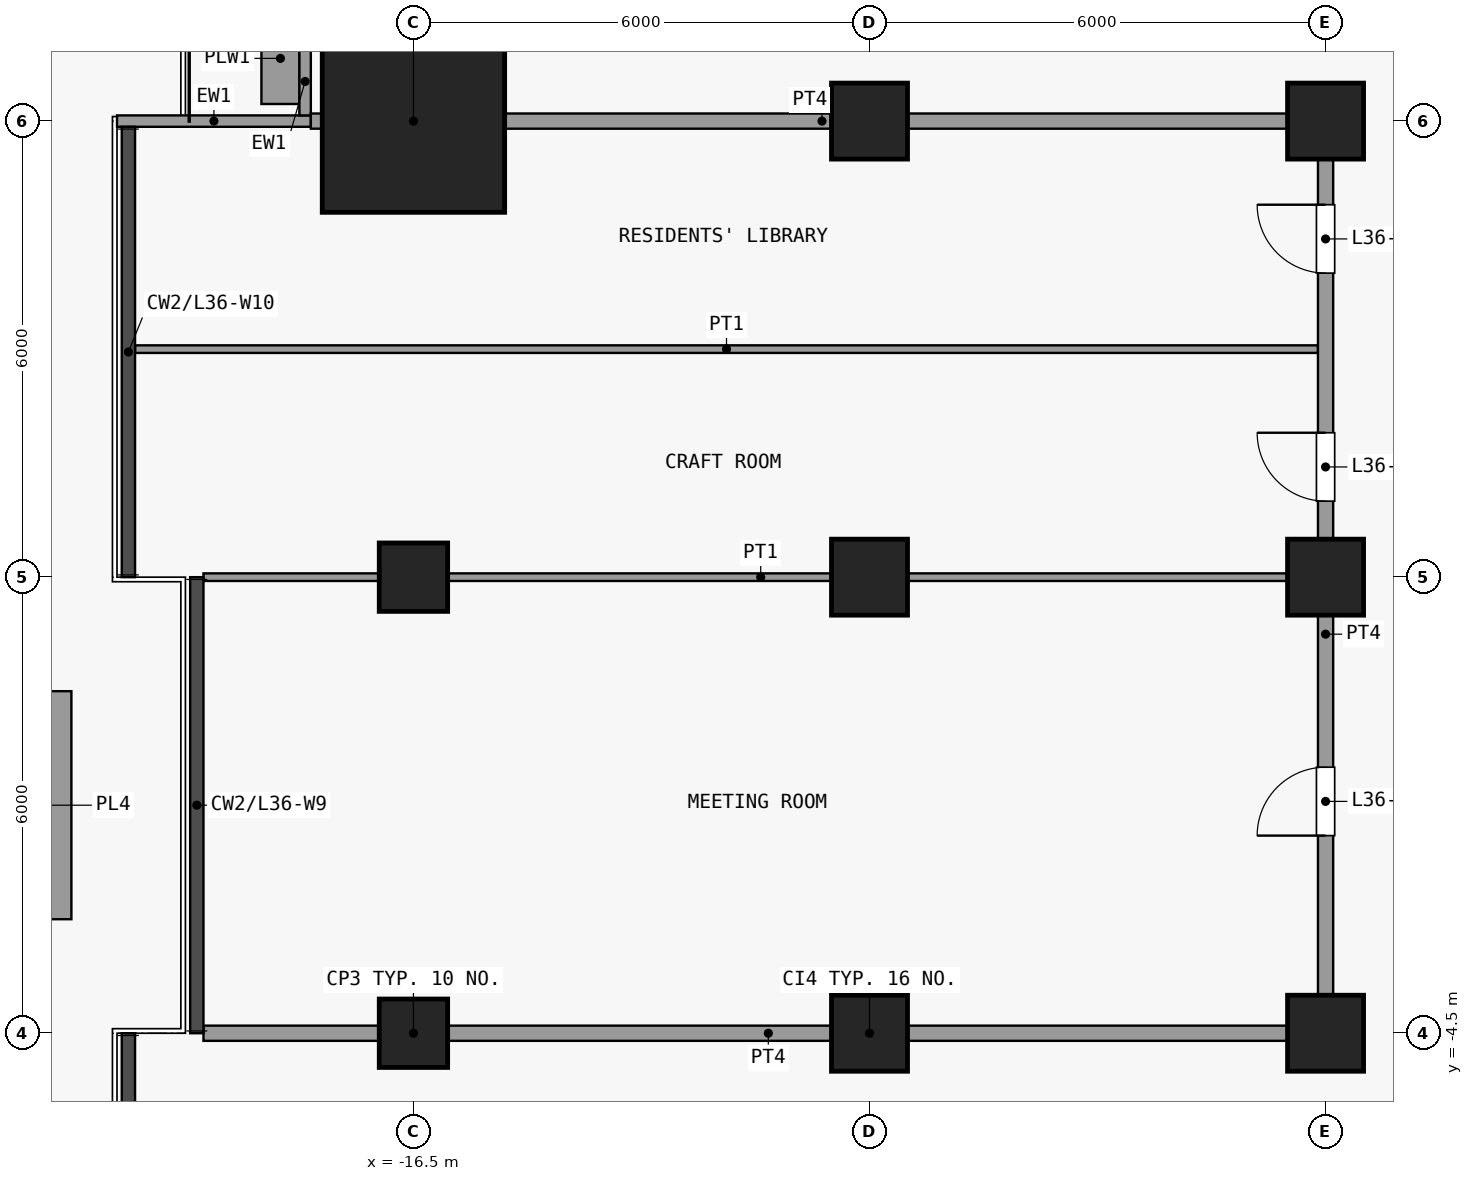
"""IFC4 building model, lengths in metres.
Left out: names, types, materials, properties, quantities, classifications, styles, units other than length and angle.
Written with IfcOpenShell. Run it as: python <this file> out.ifc"""

import sys

from ifc_helpers import new_model, si_unit, direction, frame, frame_2d, origin, origin_2d, place, context, subcontext, project, spatial, rectangle, extrude, element, fill, save


model = new_model("IFC4")
c1 = context("Model", 3, precision=1e-05, world=origin(), true_north=direction((0.0, 1.0)))
c2 = subcontext(c1, "Body", "Model", "MODEL_VIEW")
j1 = project(units=[si_unit("LENGTHUNIT", "METRE"), si_unit("PLANEANGLEUNIT", "RADIAN")], contexts=[c1])
p1 = place(None, origin())
s1 = spatial("IfcSite", under=j1, at=p1, CompositionType="ELEMENT")
p2 = place(p1, origin())
s2 = spatial("IfcBuilding", under=s1, at=p2, CompositionType="ELEMENT")
p3 = place(p2, frame((0.0, 0.0, 149.3)))
s3 = spatial("IfcBuildingStorey", under=s2, at=p3, CompositionType="ELEMENT", Elevation=149.3)
for number, where, z_axis, x_axis in (
    (1, (-16.5, -4.5, 0.0), (0.0, 0.0, 1.0), (1.0, 0.0, 0.0)),
    (2, (-16.5, 1.5, 0.0), (0.0, 0.0, 1.0), (1.0, 0.0, 0.0)),
):
    element("IfcColumn", number, at=place(p3, frame(where, z_axis=z_axis, x_axis=x_axis)), inside=s3, PredefinedType="COLUMN", context=c2, shape_type="SweptSolid", body=[
        extrude(rectangle(XDim=0.9, YDim=0.9, at=origin_2d()), origin(), (0.0, 0.0, 1.0), 3.6),
    ])
p4 = place(p3, frame((-16.5, 7.5, 0.0), z_axis=(0.0, 0.0, 1.0), x_axis=(1.0, 0.0, 0.0)))
e3 = element("IfcColumn", 3, at=p4, inside=s3, PredefinedType="COLUMN", context=c2, shape_type="SweptSolid", body=[
    extrude(rectangle(XDim=2.4, YDim=2.4, at=origin_2d()), origin(), (0.0, 0.0, 1.0), 3.6),
])
for number, where, z_axis, x_axis in (
    (4, (-10.5, -4.5, 0.0), (0.0, 0.0, 1.0), (1.0, 0.0, 0.0)),
    (5, (-10.5, 1.5, 0.0), (0.0, 0.0, 1.0), (1.0, 0.0, 0.0)),
    (6, (-10.5, 7.5, 0.0), (0.0, 0.0, 1.0), (1.0, 0.0, 0.0)),
    (7, (-4.5, -4.5, 0.0), (0.0, 0.0, 1.0), (1.0, 0.0, 0.0)),
    (8, (-4.5, 1.5, 0.0), (0.0, 0.0, 1.0), (1.0, 0.0, 0.0)),
    (9, (-4.5, 7.5, 0.0), (0.0, 0.0, 1.0), (1.0, 0.0, 0.0)),
):
    element("IfcColumn", number, at=place(p3, frame(where, z_axis=z_axis, x_axis=x_axis)), inside=s3, PredefinedType="COLUMN", context=c2, shape_type="SweptSolid", body=[
        extrude(rectangle(XDim=1.0, YDim=1.0, at=origin_2d()), origin(), (0.0, 0.0, 1.0), 3.6),
    ])
p5 = place(p3, frame((-17.85, 7.5, 0.0), z_axis=(0.0, 0.0, 1.0), x_axis=(-1.0, 0.0, 0.0)))
e10 = element("IfcWall", 10, at=p5, inside=s3, PredefinedType="SOLIDWALL", context=c2, shape_type="SweptSolid", body=[
    extrude(rectangle(XDim=2.55, YDim=0.15, at=frame_2d((1.275, 0.0))), origin(), (0.0, 0.0, 1.0), 3.3),
])
p6 = place(p3, frame((-17.925, 7.575, 0.0), z_axis=(0.0, 0.0, 1.0), x_axis=(0.0, 1.0, 0.0)))
e11 = element("IfcWall", 11, at=p6, inside=s3, PredefinedType="SOLIDWALL", context=c2, shape_type="SweptSolid", body=[
    extrude(rectangle(XDim=5.85, YDim=0.15, at=frame_2d((2.925, 0.0))), origin(), (0.0, 0.0, 1.0), 3.3),
])
p7 = place(p6, frame((3.825, 0.0, 0.0)))
e12 = element("IfcOpeningElement", 12, at=p7, cuts=e11, PredefinedType="OPENING", context=c2, shape_type="SweptSolid", body=[
    extrude(rectangle(XDim=1.2, YDim=2.4, at=frame_2d((0.6, 1.2))), frame((0.0, 0.085, 0.0), z_axis=(0.0, -1.0, 0.0), x_axis=(1.0, 0.0, 0.0)), (0.0, 0.0, 1.0), 0.17),
])
p8 = place(p6, frame((1.012, 0.0, 0.9)))
e13 = element("IfcOpeningElement", 13, at=p8, cuts=e11, PredefinedType="OPENING", context=c2, shape_type="SweptSolid", body=[
    extrude(rectangle(XDim=1.8, YDim=2.1, at=frame_2d((0.9, 1.05))), frame((0.0, 0.085, 0.0), z_axis=(0.0, -1.0, 0.0), x_axis=(1.0, 0.0, 0.0)), (0.0, 0.0, 1.0), 0.17),
])
p9 = place(p3, frame((-18.25, 7.725, 0.0), z_axis=(0.0, 0.0, 1.0), x_axis=(0.0, 1.0, 0.0)))
e14 = element("IfcWall", 14, at=p9, inside=s3, PredefinedType="USERDEFINED", context=c2, shape_type="SweptSolid", body=[
    extrude(rectangle(XDim=1.2, YDim=0.5, at=frame_2d((0.6, 0.0))), origin(), (0.0, 0.0, 1.0), 0.9),
])
p10 = place(p3, frame((-25.3, -1.5, 0.0), z_axis=(0.0, 0.0, 1.0), x_axis=(1.0, 0.0, 0.0)))
e15 = element("IfcWall", 15, at=p10, inside=s3, PredefinedType="USERDEFINED", context=c2, shape_type="SweptSolid", body=[
    extrude(rectangle(XDim=4.3, YDim=3.0, at=frame_2d((2.15, 0.0))), origin(), (0.0, 0.0, 1.0), 0.9),
])
p11 = place(p3, frame((-19.262, -4.5, 0.0), z_axis=(0.0, 0.0, 1.0), x_axis=(1.0, 0.0, 0.0)))
e16 = element("IfcWall", 16, at=p11, inside=s3, PredefinedType="PARTITIONING", context=c2, shape_type="SweptSolid", body=[
    extrude(rectangle(XDim=14.863, YDim=0.2, at=frame_2d((7.431, 0.0))), origin(), (0.0, 0.0, 1.0), 3.3),
])
p12 = place(p3, frame((-19.262, 1.5, 0.0), z_axis=(0.0, 0.0, 1.0), x_axis=(1.0, 0.0, 0.0)))
e17 = element("IfcWall", 17, at=p12, inside=s3, PredefinedType="PARTITIONING", context=c2, shape_type="SweptSolid", body=[
    extrude(rectangle(XDim=14.662, YDim=0.1, at=frame_2d((7.331, 0.0))), origin(), (0.0, 0.0, 1.0), 3.3),
])
p13 = place(p3, frame((-20.163, 4.5, 0.0), z_axis=(0.0, 0.0, 1.0), x_axis=(1.0, 0.0, 0.0)))
e18 = element("IfcWall", 18, at=p13, inside=s3, PredefinedType="PARTITIONING", context=c2, shape_type="SweptSolid", body=[
    extrude(rectangle(XDim=15.562, YDim=0.1, at=frame_2d((7.781, 0.0))), origin(), (0.0, 0.0, 1.0), 3.3),
])
p14 = place(p3, frame((-17.85, 7.5, 0.0), z_axis=(0.0, 0.0, 1.0), x_axis=(1.0, 0.0, 0.0)))
e19 = element("IfcWall", 19, at=p14, inside=s3, PredefinedType="PARTITIONING", context=c2, shape_type="SweptSolid", body=[
    extrude(rectangle(XDim=13.45, YDim=0.2, at=frame_2d((6.725, 0.0))), origin(), (0.0, 0.0, 1.0), 3.3),
])
p15 = place(p3, frame((-4.5, -4.4, 0.0), z_axis=(0.0, 0.0, 1.0), x_axis=(0.0, 1.0, 0.0)))
e20 = element("IfcWall", 20, at=p15, inside=s3, PredefinedType="PARTITIONING", context=c2, shape_type="SweptSolid", body=[
    extrude(rectangle(XDim=11.8, YDim=0.2, at=frame_2d((5.9, 0.0))), origin(), (0.0, 0.0, 1.0), 3.3),
])
p16 = place(p15, frame((2.5, 0.0, 0.0)))
e21 = element("IfcOpeningElement", 21, at=p16, cuts=e20, PredefinedType="OPENING", context=c2, shape_type="SweptSolid", body=[
    extrude(rectangle(XDim=0.9, YDim=2.1, at=frame_2d((0.45, 1.05))), frame((0.0, 0.11, 0.0), z_axis=(0.0, -1.0, 0.0), x_axis=(1.0, 0.0, 0.0)), (0.0, 0.0, 1.0), 0.22),
])
p17 = place(p15, frame((6.9, 0.0, 0.0)))
e22 = element("IfcOpeningElement", 22, at=p17, cuts=e20, PredefinedType="OPENING", context=c2, shape_type="SweptSolid", body=[
    extrude(rectangle(XDim=0.9, YDim=2.1, at=frame_2d((0.45, 1.05))), frame((0.0, 0.11, 0.0), z_axis=(0.0, -1.0, 0.0), x_axis=(1.0, 0.0, 0.0)), (0.0, 0.0, 1.0), 0.22),
])
p18 = place(p15, frame((9.9, 0.0, 0.0)))
e23 = element("IfcOpeningElement", 23, at=p18, cuts=e20, PredefinedType="OPENING", context=c2, shape_type="SweptSolid", body=[
    extrude(rectangle(XDim=0.9, YDim=2.1, at=frame_2d((0.45, 1.05))), frame((0.0, 0.11, 0.0), z_axis=(0.0, -1.0, 0.0), x_axis=(1.0, 0.0, 0.0)), (0.0, 0.0, 1.0), 0.22),
])
p19 = place(p16, origin())
e24 = element("IfcDoor", 24, at=p19, inside=s3, OperationType="SINGLE_SWING_RIGHT", PredefinedType="DOOR", context=c2, shape_type="SweptSolid", body=[
    extrude(rectangle(XDim=0.9, YDim=2.1, at=frame_2d((0.45, 1.05))), frame((0.0, 0.025, 0.0), z_axis=(0.0, -1.0, 0.0), x_axis=(1.0, 0.0, 0.0)), (0.0, 0.0, 1.0), 0.05),
])
fill(e21, e24)
p20 = place(p17, origin())
e25 = element("IfcDoor", 25, at=p20, inside=s3, OperationType="SINGLE_SWING_LEFT", PredefinedType="DOOR", context=c2, shape_type="SweptSolid", body=[
    extrude(rectangle(XDim=0.9, YDim=2.1, at=frame_2d((0.45, 1.05))), frame((0.0, 0.025, 0.0), z_axis=(0.0, -1.0, 0.0), x_axis=(1.0, 0.0, 0.0)), (0.0, 0.0, 1.0), 0.05),
])
fill(e22, e25)
p21 = place(p18, origin())
e26 = element("IfcDoor", 26, at=p21, inside=s3, OperationType="SINGLE_SWING_LEFT", PredefinedType="DOOR", context=c2, shape_type="SweptSolid", body=[
    extrude(rectangle(XDim=0.9, YDim=2.1, at=frame_2d((0.45, 1.05))), frame((0.0, 0.025, 0.0), z_axis=(0.0, -1.0, 0.0), x_axis=(1.0, 0.0, 0.0)), (0.0, 0.0, 1.0), 0.05),
])
fill(e23, e26)
save(model, sys.argv[1])
